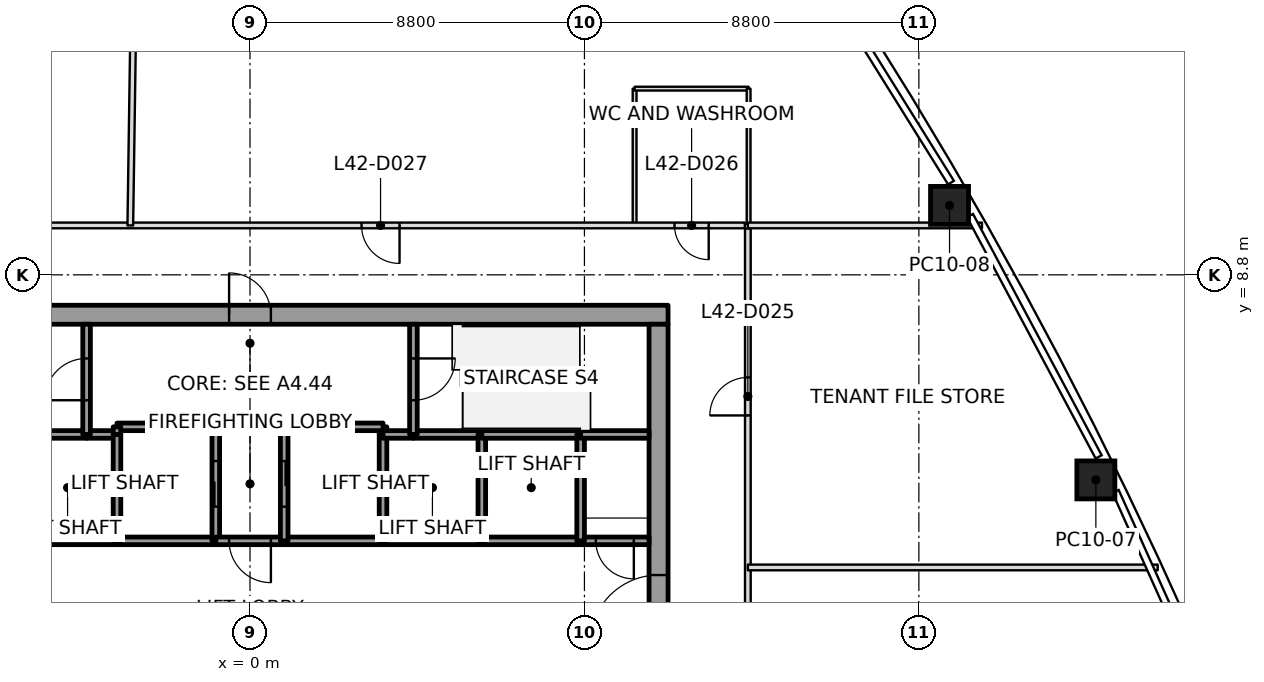
"""IFC4 building model, lengths in metres.
Left out: names, types, materials, properties, quantities, classifications, styles, units other than length and angle.
Written with IfcOpenShell. Run it as: python <this file> out.ifc"""

import sys

from ifc_helpers import new_model, si_unit, direction, frame, frame_2d, origin, origin_2d, place, context, subcontext, project, spatial, rectangle, extrude, element, fill, save


model = new_model("IFC4")
c1 = context("Model", 3, precision=1e-05, world=origin(), true_north=direction((0.0, 1.0)))
c2 = subcontext(c1, "Body", "Model", "MODEL_VIEW")
j1 = project(units=[si_unit("LENGTHUNIT", "METRE"), si_unit("PLANEANGLEUNIT", "RADIAN")], contexts=[c1])
p1 = place(None, origin())
s1 = spatial("IfcSite", under=j1, at=p1, CompositionType="ELEMENT")
p2 = place(p1, origin())
s2 = spatial("IfcBuilding", under=s1, at=p2, CompositionType="ELEMENT")
p3 = place(p2, frame((0.0, 0.0, 189.8)))
s3 = spatial("IfcBuildingStorey", under=s2, at=p3, CompositionType="ELEMENT", Elevation=189.8)
p4 = place(p3, frame((22.257, 3.404, 0.0), z_axis=(-0.014036674448, 0.002013957638, 0.999899452818), x_axis=(-0.440228043652, 0.897850463868, -0.007988373739)))
e1 = element("IfcColumn", 1, at=p4, inside=s3, PredefinedType="COLUMN", context=c2, shape_type="SweptSolid", body=[
    extrude(rectangle(XDim=1.0, YDim=1.0, at=origin_2d()), origin(), (0.0, 0.0, 1.0), 4.0),
])
p5 = place(p3, frame((18.407, 10.627, 0.0), z_axis=(-0.009887049298, -0.00573692984, 0.999934664812), x_axis=(-0.499975560967, 0.866039512843, 2.5126546e-05)))
e2 = element("IfcColumn", 2, at=p5, inside=s3, PredefinedType="COLUMN", context=c2, shape_type="SweptSolid", body=[
    extrude(rectangle(XDim=1.0, YDim=1.0, at=origin_2d()), origin(), (0.0, 0.0, 1.0), 4.0),
])
p6 = place(p3, frame((-11.0, 7.75, 0.0), z_axis=(0.0, 0.0, 1.0), x_axis=(1.0, 0.0, 0.0)))
e3 = element("IfcWall", 3, at=p6, inside=s3, PredefinedType="SHEAR", context=c2, shape_type="SweptSolid", body=[
    extrude(rectangle(XDim=22.0, YDim=0.5, at=frame_2d((11.0, 0.0))), origin(), (0.0, 0.0, 1.0), 4.0),
])
p7 = place(p6, frame((10.45, 0.0, 0.0)))
e4 = element("IfcOpeningElement", 4, at=p7, cuts=e3, PredefinedType="OPENING", context=c2, shape_type="SweptSolid", body=[
    extrude(rectangle(XDim=1.1, YDim=2.1, at=frame_2d((0.55, 1.05))), frame((0.0, 0.25, 0.0), z_axis=(0.0, -1.0, 0.0), x_axis=(1.0, 0.0, 0.0)), (0.0, 0.0, 1.0), 0.5),
])
p8 = place(p3, frame((10.75, -7.5, 0.0), z_axis=(0.0, 0.0, 1.0), x_axis=(0.0, 1.0, 0.0)))
e5 = element("IfcWall", 5, at=p8, inside=s3, PredefinedType="SHEAR", context=c2, shape_type="SweptSolid", body=[
    extrude(rectangle(XDim=15.0, YDim=0.5, at=frame_2d((7.5, 0.0))), origin(), (0.0, 0.0, 1.0), 4.0),
])
p9 = place(p8, frame((6.6, 0.0, 0.0)))
e6 = element("IfcOpeningElement", 6, at=p9, cuts=e5, PredefinedType="OPENING", context=c2, shape_type="SweptSolid", body=[
    extrude(rectangle(XDim=1.8, YDim=2.1, at=frame_2d((0.9, 1.05))), frame((0.0, 0.25, 0.0), z_axis=(0.0, -1.0, 0.0), x_axis=(1.0, 0.0, 0.0)), (0.0, 0.0, 1.0), 0.5),
])
p10 = place(p3, frame((-3.5, 1.8, 0.0), z_axis=(0.0, 0.0, 1.0), x_axis=(-1.0, 0.0, 0.0)))
e7 = element("IfcWall", 7, at=p10, inside=s3, PredefinedType="SOLIDWALL", context=c2, shape_type="SweptSolid", body=[
    extrude(rectangle(XDim=2.6, YDim=0.2, at=frame_2d((1.3, 0.0))), origin(), (0.0, 0.0, 1.0), 3.85),
])
p11 = place(p3, frame((-4.3, 4.6, 0.0), z_axis=(0.0, 0.0, 1.0), x_axis=(-1.0, 0.0, 0.0)))
e8 = element("IfcWall", 8, at=p11, inside=s3, PredefinedType="SOLIDWALL", context=c2, shape_type="SweptSolid", body=[
    extrude(rectangle(XDim=1.8, YDim=0.2, at=frame_2d((0.9, 0.0))), origin(), (0.0, 0.0, 1.0), 3.85),
])
p12 = place(p3, frame((-3.5, 4.6, 0.0), z_axis=(0.0, 0.0, 1.0), x_axis=(-1.0, 0.0, 0.0)))
e9 = element("IfcWall", 9, at=p12, inside=s3, PredefinedType="SOLIDWALL", context=c2, shape_type="SweptSolid", body=[
    extrude(rectangle(XDim=0.8, YDim=0.2, at=frame_2d((0.4, 0.0))), origin(), (0.0, 0.0, 1.0), 3.85),
])
p13 = place(p3, frame((-4.3, 4.6, 0.0), z_axis=(0.0, 0.0, 1.0), x_axis=(0.0, 1.0, 0.0)))
e10 = element("IfcWall", 10, at=p13, inside=s3, PredefinedType="SOLIDWALL", context=c2, shape_type="SweptSolid", body=[
    extrude(rectangle(XDim=2.9, YDim=0.2, at=frame_2d((1.45, 0.0))), origin(), (0.0, 0.0, 1.0), 3.85),
])
p14 = place(p13, frame((0.9, 0.0, 0.0)))
e11 = element("IfcOpeningElement", 11, at=p14, cuts=e10, PredefinedType="OPENING", context=c2, shape_type="SweptSolid", body=[
    extrude(rectangle(XDim=1.1, YDim=2.1, at=frame_2d((0.55, 1.05))), frame((0.0, 0.1, 0.0), z_axis=(0.0, -1.0, 0.0), x_axis=(1.0, 0.0, 0.0)), (0.0, 0.0, 1.0), 0.2),
])
p15 = place(p3, frame((-0.9, 1.8, 0.0), z_axis=(0.0, 0.0, 1.0), x_axis=(-1.0, 0.0, 0.0)))
e12 = element("IfcWall", 12, at=p15, inside=s3, PredefinedType="SOLIDWALL", context=c2, shape_type="SweptSolid", body=[
    extrude(rectangle(XDim=2.6, YDim=0.2, at=frame_2d((1.3, 0.0))), origin(), (0.0, 0.0, 1.0), 3.85),
])
p16 = place(p3, frame((-3.5, 4.6, 0.0), z_axis=(0.0, 0.0, 1.0), x_axis=(0.0, -1.0, 0.0)))
e13 = element("IfcWall", 13, at=p16, inside=s3, PredefinedType="SOLIDWALL", context=c2, shape_type="SweptSolid", body=[
    extrude(rectangle(XDim=2.8, YDim=0.2, at=frame_2d((1.4, 0.0))), origin(), (0.0, 0.0, 1.0), 3.85),
])
p17 = place(p3, frame((-0.9, 1.8, 0.0), z_axis=(0.0, 0.0, 1.0), x_axis=(0.0, 1.0, 0.0)))
e14 = element("IfcWall", 14, at=p17, inside=s3, PredefinedType="SOLIDWALL", context=c2, shape_type="SweptSolid", body=[
    extrude(rectangle(XDim=3.0, YDim=0.2, at=frame_2d((1.5, 0.0))), origin(), (0.0, 0.0, 1.0), 3.85),
])
p18 = place(p17, frame((0.9, 0.0, 0.0)))
e15 = element("IfcOpeningElement", 15, at=p18, cuts=e14, PredefinedType="OPENING", context=c2, shape_type="SweptSolid", body=[
    extrude(rectangle(XDim=1.2, YDim=2.1, at=frame_2d((0.6, 1.05))), frame((0.0, 0.1, 0.0), z_axis=(0.0, -1.0, 0.0), x_axis=(1.0, 0.0, 0.0)), (0.0, 0.0, 1.0), 0.2),
])
p19 = place(p3, frame((-0.9, 4.8, 0.0), z_axis=(0.0, 0.0, 1.0), x_axis=(-1.0, 0.0, 0.0)))
e16 = element("IfcWall", 16, at=p19, inside=s3, PredefinedType="SOLIDWALL", context=c2, shape_type="SweptSolid", body=[
    extrude(rectangle(XDim=2.6, YDim=0.2, at=frame_2d((1.3, 0.0))), origin(), (0.0, 0.0, 1.0), 3.85),
])
p20 = place(p3, frame((-3.5, 4.8, 0.0), z_axis=(0.0, 0.0, 1.0), x_axis=(0.0, -1.0, 0.0)))
e17 = element("IfcWall", 17, at=p20, inside=s3, PredefinedType="SOLIDWALL", context=c2, shape_type="SweptSolid", body=[
    extrude(rectangle(XDim=0.2, YDim=0.2, at=frame_2d((0.1, 0.0))), origin(), (0.0, 0.0, 1.0), 3.85),
])
p21 = place(p3, frame((0.9, 1.8, 0.0), z_axis=(0.0, 0.0, 1.0), x_axis=(-1.0, 0.0, 0.0)))
e18 = element("IfcWall", 18, at=p21, inside=s3, PredefinedType="SOLIDWALL", context=c2, shape_type="SweptSolid", body=[
    extrude(rectangle(XDim=1.8, YDim=0.2, at=frame_2d((0.9, 0.0))), origin(), (0.0, 0.0, 1.0), 3.85),
])
p22 = place(p21, frame((0.35, 0.0, 0.0)))
e19 = element("IfcOpeningElement", 19, at=p22, cuts=e18, PredefinedType="OPENING", context=c2, shape_type="SweptSolid", body=[
    extrude(rectangle(XDim=1.1, YDim=2.1, at=frame_2d((0.55, 1.05))), frame((0.0, 0.1, 0.0), z_axis=(0.0, -1.0, 0.0), x_axis=(1.0, 0.0, 0.0)), (0.0, 0.0, 1.0), 0.2),
])
p23 = place(p3, frame((3.5, 1.8, 0.0), z_axis=(0.0, 0.0, 1.0), x_axis=(-1.0, 0.0, 0.0)))
e20 = element("IfcWall", 20, at=p23, inside=s3, PredefinedType="SOLIDWALL", context=c2, shape_type="SweptSolid", body=[
    extrude(rectangle(XDim=2.6, YDim=0.2, at=frame_2d((1.3, 0.0))), origin(), (0.0, 0.0, 1.0), 3.85),
])
p24 = place(p3, frame((3.5, 4.6, 0.0), z_axis=(0.0, 0.0, 1.0), x_axis=(0.0, 1.0, 0.0)))
e21 = element("IfcWall", 21, at=p24, inside=s3, PredefinedType="SOLIDWALL", context=c2, shape_type="SweptSolid", body=[
    extrude(rectangle(XDim=0.2, YDim=0.2, at=frame_2d((0.1, 0.0))), origin(), (0.0, 0.0, 1.0), 3.85),
])
p25 = place(p3, frame((3.5, 4.8, 0.0), z_axis=(0.0, 0.0, 1.0), x_axis=(-1.0, 0.0, 0.0)))
e22 = element("IfcWall", 22, at=p25, inside=s3, PredefinedType="SOLIDWALL", context=c2, shape_type="SweptSolid", body=[
    extrude(rectangle(XDim=2.6, YDim=0.2, at=frame_2d((1.3, 0.0))), origin(), (0.0, 0.0, 1.0), 3.85),
])
p26 = place(p3, frame((0.9, 4.8, 0.0), z_axis=(0.0, 0.0, 1.0), x_axis=(0.0, -1.0, 0.0)))
e23 = element("IfcWall", 23, at=p26, inside=s3, PredefinedType="SOLIDWALL", context=c2, shape_type="SweptSolid", body=[
    extrude(rectangle(XDim=3.0, YDim=0.2, at=frame_2d((1.5, 0.0))), origin(), (0.0, 0.0, 1.0), 3.85),
])
p27 = place(p26, frame((0.9, 0.0, 0.0)))
e24 = element("IfcOpeningElement", 24, at=p27, cuts=e23, PredefinedType="OPENING", context=c2, shape_type="SweptSolid", body=[
    extrude(rectangle(XDim=1.2, YDim=2.1, at=frame_2d((0.6, 1.05))), frame((0.0, 0.1, 0.0), z_axis=(0.0, -1.0, 0.0), x_axis=(1.0, 0.0, 0.0)), (0.0, 0.0, 1.0), 0.2),
])
p28 = place(p3, frame((6.1, 1.8, 0.0), z_axis=(0.0, 0.0, 1.0), x_axis=(-1.0, 0.0, 0.0)))
e25 = element("IfcWall", 25, at=p28, inside=s3, PredefinedType="SOLIDWALL", context=c2, shape_type="SweptSolid", body=[
    extrude(rectangle(XDim=2.6, YDim=0.2, at=frame_2d((1.3, 0.0))), origin(), (0.0, 0.0, 1.0), 3.85),
])
p29 = place(p3, frame((3.5, 1.8, 0.0), z_axis=(0.0, 0.0, 1.0), x_axis=(0.0, 1.0, 0.0)))
e26 = element("IfcWall", 26, at=p29, inside=s3, PredefinedType="SOLIDWALL", context=c2, shape_type="SweptSolid", body=[
    extrude(rectangle(XDim=2.8, YDim=0.2, at=frame_2d((1.4, 0.0))), origin(), (0.0, 0.0, 1.0), 3.85),
])
p30 = place(p3, frame((4.3, 4.6, 0.0), z_axis=(0.0, 0.0, 1.0), x_axis=(-1.0, 0.0, 0.0)))
e27 = element("IfcWall", 27, at=p30, inside=s3, PredefinedType="SOLIDWALL", context=c2, shape_type="SweptSolid", body=[
    extrude(rectangle(XDim=0.8, YDim=0.2, at=frame_2d((0.4, 0.0))), origin(), (0.0, 0.0, 1.0), 3.85),
])
p31 = place(p3, frame((6.1, 4.6, 0.0), z_axis=(0.0, 0.0, 1.0), x_axis=(-1.0, 0.0, 0.0)))
e28 = element("IfcWall", 28, at=p31, inside=s3, PredefinedType="SOLIDWALL", context=c2, shape_type="SweptSolid", body=[
    extrude(rectangle(XDim=1.8, YDim=0.2, at=frame_2d((0.9, 0.0))), origin(), (0.0, 0.0, 1.0), 3.85),
])
p32 = place(p3, frame((4.3, 7.5, 0.0), z_axis=(0.0, 0.0, 1.0), x_axis=(0.0, -1.0, 0.0)))
e29 = element("IfcWall", 29, at=p32, inside=s3, PredefinedType="SOLIDWALL", context=c2, shape_type="SweptSolid", body=[
    extrude(rectangle(XDim=2.9, YDim=0.2, at=frame_2d((1.45, 0.0))), origin(), (0.0, 0.0, 1.0), 3.85),
])
p33 = place(p32, frame((0.9, 0.0, 0.0)))
e30 = element("IfcOpeningElement", 30, at=p33, cuts=e29, PredefinedType="OPENING", context=c2, shape_type="SweptSolid", body=[
    extrude(rectangle(XDim=1.1, YDim=2.1, at=frame_2d((0.55, 1.05))), frame((0.0, 0.1, 0.0), z_axis=(0.0, -1.0, 0.0), x_axis=(1.0, 0.0, 0.0)), (0.0, 0.0, 1.0), 0.2),
])
p34 = place(p3, frame((8.7, 1.8, 0.0), z_axis=(0.0, 0.0, 1.0), x_axis=(-1.0, 0.0, 0.0)))
e31 = element("IfcWall", 31, at=p34, inside=s3, PredefinedType="SOLIDWALL", context=c2, shape_type="SweptSolid", body=[
    extrude(rectangle(XDim=2.6, YDim=0.2, at=frame_2d((1.3, 0.0))), origin(), (0.0, 0.0, 1.0), 3.85),
])
p35 = place(p3, frame((6.1, 1.8, 0.0), z_axis=(0.0, 0.0, 1.0), x_axis=(0.0, 1.0, 0.0)))
e32 = element("IfcWall", 32, at=p35, inside=s3, PredefinedType="SOLIDWALL", context=c2, shape_type="SweptSolid", body=[
    extrude(rectangle(XDim=2.8, YDim=0.2, at=frame_2d((1.4, 0.0))), origin(), (0.0, 0.0, 1.0), 3.85),
])
p36 = place(p3, frame((8.7, 4.6, 0.0), z_axis=(0.0, 0.0, 1.0), x_axis=(-1.0, 0.0, 0.0)))
e33 = element("IfcWall", 33, at=p36, inside=s3, PredefinedType="SOLIDWALL", context=c2, shape_type="SweptSolid", body=[
    extrude(rectangle(XDim=2.6, YDim=0.2, at=frame_2d((1.3, 0.0))), origin(), (0.0, 0.0, 1.0), 3.85),
])
p37 = place(p3, frame((10.5, 1.8, 0.0), z_axis=(0.0, 0.0, 1.0), x_axis=(-1.0, 0.0, 0.0)))
e34 = element("IfcWall", 34, at=p37, inside=s3, PredefinedType="SOLIDWALL", context=c2, shape_type="SweptSolid", body=[
    extrude(rectangle(XDim=1.8, YDim=0.2, at=frame_2d((0.9, 0.0))), origin(), (0.0, 0.0, 1.0), 3.85),
])
p38 = place(p37, frame((0.4, 0.0, 0.0)))
e35 = element("IfcOpeningElement", 35, at=p38, cuts=e34, PredefinedType="OPENING", context=c2, shape_type="SweptSolid", body=[
    extrude(rectangle(XDim=1.0, YDim=2.1, at=frame_2d((0.5, 1.05))), frame((0.0, 0.1, 0.0), z_axis=(0.0, -1.0, 0.0), x_axis=(1.0, 0.0, 0.0)), (0.0, 0.0, 1.0), 0.2),
])
p39 = place(p3, frame((8.7, 4.6, 0.0), z_axis=(0.0, 0.0, 1.0), x_axis=(0.0, -1.0, 0.0)))
e36 = element("IfcWall", 36, at=p39, inside=s3, PredefinedType="SOLIDWALL", context=c2, shape_type="SweptSolid", body=[
    extrude(rectangle(XDim=2.8, YDim=0.2, at=frame_2d((1.4, 0.0))), origin(), (0.0, 0.0, 1.0), 3.85),
])
p40 = place(p3, frame((10.5, 4.6, 0.0), z_axis=(0.0, 0.0, 1.0), x_axis=(-1.0, 0.0, 0.0)))
e37 = element("IfcWall", 37, at=p40, inside=s3, PredefinedType="SOLIDWALL", context=c2, shape_type="SweptSolid", body=[
    extrude(rectangle(XDim=1.8, YDim=0.2, at=frame_2d((0.9, 0.0))), origin(), (0.0, 0.0, 1.0), 3.85),
])
p41 = place(p3, frame((-3.15, 10.1, 0.0), z_axis=(0.0, 0.0, 1.0), x_axis=(0.014702310804, 0.999891915187, 0.0)))
e38 = element("IfcWall", 38, at=p41, inside=s3, PredefinedType="PARTITIONING", context=c2, shape_type="SweptSolid", body=[
    extrude(rectangle(XDim=21.737, YDim=0.15, at=frame_2d((10.868, 0.0))), origin(), (0.0, 0.0, 1.0), 3.234),
])
p42 = place(p3, frame((23.885, 1.1, 0.0), z_axis=(0.0, 0.0, 1.0), x_axis=(-1.0, 0.0, 0.0)))
e39 = element("IfcWall", 39, at=p42, inside=s3, PredefinedType="PARTITIONING", context=c2, shape_type="SweptSolid", body=[
    extrude(rectangle(XDim=10.785, YDim=0.15, at=frame_2d((5.392, 0.0))), origin(), (0.0, 0.0, 1.0), 3.234),
])
p43 = place(p3, frame((13.1, 10.1, 0.0), z_axis=(0.0, 0.0, 1.0), x_axis=(1.0, 0.0, 0.0)))
e40 = element("IfcWall", 40, at=p43, inside=s3, PredefinedType="PARTITIONING", context=c2, shape_type="SweptSolid", body=[
    extrude(rectangle(XDim=6.161, YDim=0.15, at=frame_2d((3.08, 0.0))), origin(), (0.0, 0.0, 1.0), 3.234),
])
p44 = place(p3, frame((13.02, 10.1, 0.0), z_axis=(0.0, 0.0, 1.0), x_axis=(-1.0, 0.0, 0.0)))
e41 = element("IfcWall", 41, at=p44, inside=s3, PredefinedType="PARTITIONING", context=c2, shape_type="SweptSolid", body=[
    extrude(rectangle(XDim=25.17, YDim=0.15, at=frame_2d((12.585, 0.0))), origin(), (0.0, 0.0, 1.0), 3.166),
])
p45 = place(p44, frame((0.95, 0.0, 0.0)))
e42 = element("IfcOpeningElement", 42, at=p45, cuts=e41, PredefinedType="OPENING", context=c2, shape_type="SweptSolid", body=[
    extrude(rectangle(XDim=0.9, YDim=2.1, at=frame_2d((0.45, 1.05))), frame((0.0, 0.075, 0.0), z_axis=(0.0, -1.0, 0.0), x_axis=(1.0, 0.0, 0.0)), (0.0, 0.0, 1.0), 0.15),
])
p46 = place(p44, frame((9.085, 0.0, 0.0)))
e43 = element("IfcOpeningElement", 43, at=p46, cuts=e41, PredefinedType="OPENING", context=c2, shape_type="SweptSolid", body=[
    extrude(rectangle(XDim=1.0, YDim=2.1, at=frame_2d((0.5, 1.05))), frame((0.0, 0.075, 0.0), z_axis=(0.0, -1.0, 0.0), x_axis=(1.0, 0.0, 0.0)), (0.0, 0.0, 1.0), 0.15),
])
p47 = place(p44, frame((20.17, 0.0, 0.0)))
e44 = element("IfcOpeningElement", 44, at=p47, cuts=e41, PredefinedType="OPENING", context=c2, shape_type="SweptSolid", body=[
    extrude(rectangle(XDim=1.0, YDim=2.1, at=frame_2d((0.5, 1.05))), frame((0.0, 0.075, 0.0), z_axis=(0.0, -1.0, 0.0), x_axis=(1.0, 0.0, 0.0)), (0.0, 0.0, 1.0), 0.15),
])
p48 = place(p3, frame((13.1, -10.02, 0.0), z_axis=(0.0, 0.0, 1.0), x_axis=(0.0, 1.0, 0.0)))
e45 = element("IfcWall", 45, at=p48, inside=s3, PredefinedType="PARTITIONING", context=c2, shape_type="SweptSolid", body=[
    extrude(rectangle(XDim=20.04, YDim=0.15, at=frame_2d((10.02, 0.0))), origin(), (0.0, 0.0, 1.0), 3.166),
])
p49 = place(p48, frame((15.12, 0.0, 0.0)))
e46 = element("IfcOpeningElement", 46, at=p49, cuts=e45, PredefinedType="OPENING", context=c2, shape_type="SweptSolid", body=[
    extrude(rectangle(XDim=1.0, YDim=2.1, at=frame_2d((0.5, 1.05))), frame((0.0, 0.075, 0.0), z_axis=(0.0, -1.0, 0.0), x_axis=(1.0, 0.0, 0.0)), (0.0, 0.0, 1.0), 0.15),
])
p50 = place(p48, frame((0.95, 0.0, 0.0)))
e47 = element("IfcOpeningElement", 47, at=p50, cuts=e45, PredefinedType="OPENING", context=c2, shape_type="SweptSolid", body=[
    extrude(rectangle(XDim=0.9, YDim=2.1, at=frame_2d((0.45, 1.05))), frame((0.0, 0.075, 0.0), z_axis=(0.0, -1.0, 0.0), x_axis=(1.0, 0.0, 0.0)), (0.0, 0.0, 1.0), 0.15),
])
p51 = place(p48, frame((6.56, 0.0, 0.0)))
e48 = element("IfcOpeningElement", 48, at=p51, cuts=e45, PredefinedType="OPENING", context=c2, shape_type="SweptSolid", body=[
    extrude(rectangle(XDim=1.0, YDim=2.1, at=frame_2d((0.5, 1.05))), frame((0.0, 0.075, 0.0), z_axis=(0.0, -1.0, 0.0), x_axis=(1.0, 0.0, 0.0)), (0.0, 0.0, 1.0), 0.15),
])
p52 = place(p3, frame((10.12, 10.13, 0.0), z_axis=(0.0, 0.0, 1.0), x_axis=(0.0, 1.0, 0.0)))
e49 = element("IfcWall", 49, at=p52, inside=s3, PredefinedType="PARTITIONING", context=c2, shape_type="SweptSolid", body=[
    extrude(rectangle(XDim=3.57, YDim=0.1, at=frame_2d((1.785, 0.0))), origin(), (0.0, 0.0, 1.0), 3.247),
])
p53 = place(p3, frame((10.12, 13.7, 0.0), z_axis=(0.0, 0.0, 1.0), x_axis=(1.0, 0.0, 0.0)))
e50 = element("IfcWall", 50, at=p53, inside=s3, PredefinedType="PARTITIONING", context=c2, shape_type="SweptSolid", body=[
    extrude(rectangle(XDim=3.0, YDim=0.1, at=frame_2d((1.5, 0.0))), origin(), (0.0, 0.0, 1.0), 3.247),
])
p54 = place(p3, frame((13.12, 13.7, 0.0), z_axis=(0.0, 0.0, 1.0), x_axis=(0.0, -1.0, 0.0)))
e51 = element("IfcWall", 51, at=p54, inside=s3, PredefinedType="PARTITIONING", context=c2, shape_type="SweptSolid", body=[
    extrude(rectangle(XDim=3.57, YDim=0.1, at=frame_2d((1.785, 0.0))), origin(), (0.0, 0.0, 1.0), 3.393),
])
p55 = place(p49, origin())
e52 = element("IfcDoor", 52, at=p55, inside=s3, OperationType="SINGLE_SWING_LEFT", PredefinedType="DOOR", context=c2, shape_type="SweptSolid", body=[
    extrude(rectangle(XDim=1.0, YDim=2.1, at=frame_2d((0.5, 1.05))), frame((0.0, 0.025, 0.0), z_axis=(0.0, -1.0, 0.0), x_axis=(1.0, 0.0, 0.0)), (0.0, 0.0, 1.0), 0.05),
])
fill(e46, e52)
p56 = place(p45, origin())
e53 = element("IfcDoor", 53, at=p56, inside=s3, OperationType="SINGLE_SWING_RIGHT", PredefinedType="DOOR", context=c2, shape_type="SweptSolid", body=[
    extrude(rectangle(XDim=0.9, YDim=2.1, at=frame_2d((0.45, 1.05))), frame((0.0, 0.025, 0.0), z_axis=(0.0, -1.0, 0.0), x_axis=(1.0, 0.0, 0.0)), (0.0, 0.0, 1.0), 0.05),
])
fill(e42, e53)
p57 = place(p46, origin())
e54 = element("IfcDoor", 54, at=p57, inside=s3, OperationType="SINGLE_SWING_RIGHT", PredefinedType="DOOR", context=c2, shape_type="SweptSolid", body=[
    extrude(rectangle(XDim=1.0, YDim=2.1, at=frame_2d((0.5, 1.05))), frame((0.0, 0.025, 0.0), z_axis=(0.0, -1.0, 0.0), x_axis=(1.0, 0.0, 0.0)), (0.0, 0.0, 1.0), 0.05),
])
fill(e43, e54)
p58 = place(p18, origin())
e55 = element("IfcDoor", 55, at=p58, inside=s3, OperationType="SLIDING_TO_RIGHT", PredefinedType="DOOR", context=c2, shape_type="SweptSolid", body=[
    extrude(rectangle(XDim=1.2, YDim=2.1, at=frame_2d((0.6, 1.05))), frame((0.0, 0.025, 0.0), z_axis=(0.0, -1.0, 0.0), x_axis=(1.0, 0.0, 0.0)), (0.0, 0.0, 1.0), 0.05),
])
fill(e15, e55)
p59 = place(p27, origin())
e56 = element("IfcDoor", 56, at=p59, inside=s3, OperationType="SLIDING_TO_RIGHT", PredefinedType="DOOR", context=c2, shape_type="SweptSolid", body=[
    extrude(rectangle(XDim=1.2, YDim=2.1, at=frame_2d((0.6, 1.05))), frame((0.0, 0.025, 0.0), z_axis=(0.0, -1.0, 0.0), x_axis=(1.0, 0.0, 0.0)), (0.0, 0.0, 1.0), 0.05),
])
fill(e24, e56)
p60 = place(p22, origin())
e57 = element("IfcDoor", 57, at=p60, inside=s3, OperationType="SINGLE_SWING_LEFT", PredefinedType="DOOR", context=c2, shape_type="SweptSolid", body=[
    extrude(rectangle(XDim=1.1, YDim=2.1, at=frame_2d((0.55, 1.05))), frame((0.0, 0.025, 0.0), z_axis=(0.0, -1.0, 0.0), x_axis=(1.0, 0.0, 0.0)), (0.0, 0.0, 1.0), 0.05),
])
fill(e19, e57)
p61 = place(p38, origin())
e58 = element("IfcDoor", 58, at=p61, inside=s3, OperationType="SINGLE_SWING_LEFT", PredefinedType="DOOR", context=c2, shape_type="SweptSolid", body=[
    extrude(rectangle(XDim=1.0, YDim=2.1, at=frame_2d((0.5, 1.05))), frame((0.0, 0.025, 0.0), z_axis=(0.0, -1.0, 0.0), x_axis=(1.0, 0.0, 0.0)), (0.0, 0.0, 1.0), 0.05),
])
fill(e35, e58)
p62 = place(p14, origin())
e59 = element("IfcDoor", 59, at=p62, inside=s3, OperationType="SINGLE_SWING_RIGHT", PredefinedType="DOOR", context=c2, shape_type="SweptSolid", body=[
    extrude(rectangle(XDim=1.1, YDim=2.1, at=frame_2d((0.55, 1.05))), frame((0.0, 0.025, 0.0), z_axis=(0.0, -1.0, 0.0), x_axis=(1.0, 0.0, 0.0)), (0.0, 0.0, 1.0), 0.05),
])
fill(e11, e59)
p63 = place(p33, origin())
e60 = element("IfcDoor", 60, at=p63, inside=s3, OperationType="SINGLE_SWING_RIGHT", PredefinedType="DOOR", context=c2, shape_type="SweptSolid", body=[
    extrude(rectangle(XDim=1.1, YDim=2.1, at=frame_2d((0.55, 1.05))), frame((0.0, 0.025, 0.0), z_axis=(0.0, -1.0, 0.0), x_axis=(1.0, 0.0, 0.0)), (0.0, 0.0, 1.0), 0.05),
])
fill(e30, e60)
p64 = place(p9, origin())
e61 = element("IfcDoor", 61, at=p64, inside=s3, OperationType="DOUBLE_DOOR_SINGLE_SWING", PredefinedType="DOOR", context=c2, shape_type="SweptSolid", body=[
    extrude(rectangle(XDim=1.8, YDim=2.1, at=frame_2d((0.9, 1.05))), frame((0.0, 0.025, 0.0), z_axis=(0.0, -1.0, 0.0), x_axis=(1.0, 0.0, 0.0)), (0.0, 0.0, 1.0), 0.05),
])
fill(e6, e61)
p65 = place(p7, origin())
e62 = element("IfcDoor", 62, at=p65, inside=s3, OperationType="SINGLE_SWING_RIGHT", PredefinedType="DOOR", context=c2, shape_type="SweptSolid", body=[
    extrude(rectangle(XDim=1.1, YDim=2.1, at=frame_2d((0.55, 1.05))), frame((0.0, 0.025, 0.0), z_axis=(0.0, -1.0, 0.0), x_axis=(1.0, 0.0, 0.0)), (0.0, 0.0, 1.0), 0.05),
])
fill(e4, e62)
save(model, sys.argv[1])
